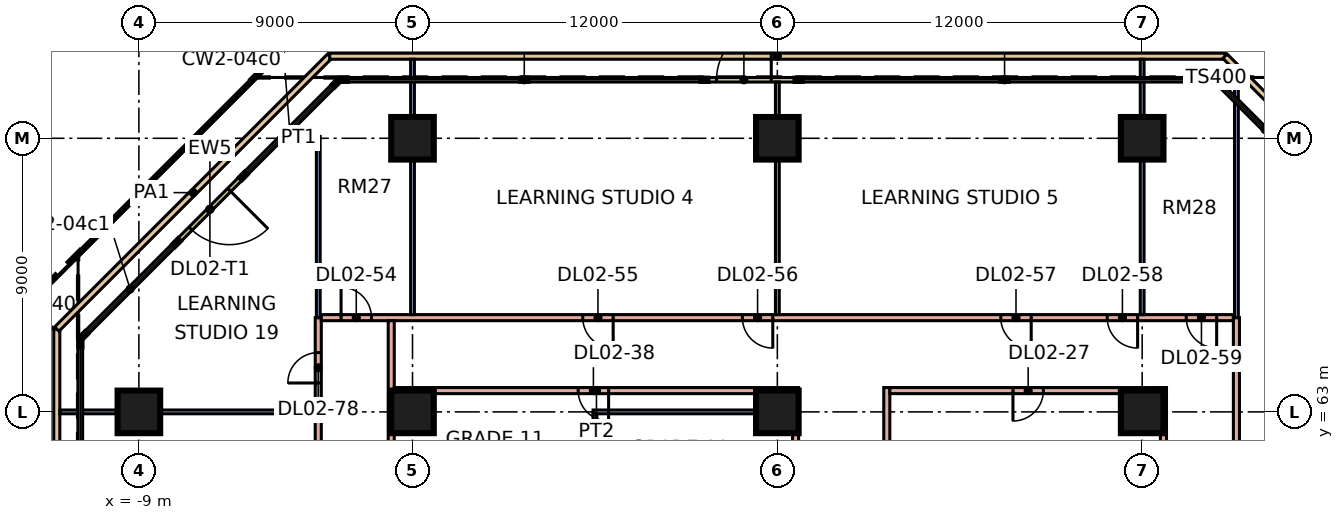
"""IFC4 building model, lengths in metres.
Left out: names, types, materials, properties, quantities, classifications, styles, units other than length and angle.
Written with IfcOpenShell. Run it as: python <this file> out.ifc"""

import sys

from ifc_helpers import new_model, si_unit, direction, frame, frame_2d, origin, origin_2d, place, context, subcontext, project, spatial, rectangle, extrude, element, fill, save


model = new_model("IFC4")
c1 = context("Model", 3, precision=1e-05, world=origin(), true_north=direction((0.0, 1.0)))
c2 = subcontext(c1, "Body", "Model", "MODEL_VIEW")
j1 = project(units=[si_unit("LENGTHUNIT", "METRE"), si_unit("PLANEANGLEUNIT", "RADIAN")], contexts=[c1])
p1 = place(None, origin())
s1 = spatial("IfcSite", under=j1, at=p1, CompositionType="ELEMENT")
p2 = place(p1, origin())
s2 = spatial("IfcBuilding", under=s1, at=p2, CompositionType="ELEMENT")
p3 = place(p2, frame((0.0, 0.0, 12.0)))
s3 = spatial("IfcBuildingStorey", under=s2, at=p3, CompositionType="ELEMENT", Elevation=12.0)
for number, where, z_axis, x_axis in (
    (1, (-9.0, 63.0, 0.0), (0.0, 0.0, 1.0), (1.0, 0.0, 0.0)),
    (2, (0.0, 63.0, 0.0), (0.0, 0.0, 1.0), (1.0, 0.0, 0.0)),
    (3, (12.0, 63.0, 0.0), (0.0, 0.0, 1.0), (1.0, 0.0, 0.0)),
    (4, (24.0, 63.0, 0.0), (0.0, 0.0, 1.0), (1.0, 0.0, 0.0)),
    (5, (0.0, 72.0, 0.0), (0.0, 0.0, 1.0), (1.0, 0.0, 0.0)),
    (6, (12.0, 72.0, 0.0), (0.0, 0.0, 1.0), (1.0, 0.0, 0.0)),
    (7, (24.0, 72.0, 0.0), (0.0, 0.0, 1.0), (1.0, 0.0, 0.0)),
):
    element("IfcColumn", number, at=place(p3, frame(where, z_axis=z_axis, x_axis=x_axis)), inside=s3, PredefinedType="COLUMN", context=c2, shape_type="SweptSolid", body=[
        extrude(rectangle(XDim=1.4, YDim=1.4, at=origin_2d()), origin(), (0.0, 0.0, 1.0), 4.8),
    ])
p4 = place(p3, frame((12.65, 73.925, 0.0), z_axis=(0.0, 0.0, 1.0), x_axis=(-1.0, 0.0, 0.0)))
e8 = element("IfcWall", 8, at=p4, inside=s3, PredefinedType="SOLIDWALL", context=c2, shape_type="SweptSolid", body=[
    extrude(rectangle(XDim=3.0, YDim=0.15, at=frame_2d((1.5, 0.0))), origin(), (0.0, 0.0, 1.0), 4.4),
])
p5 = place(p4, frame((0.85, 0.0, 0.0)))
e9 = element("IfcOpeningElement", 9, at=p5, cuts=e8, PredefinedType="OPENING", context=c2, shape_type="SweptSolid", body=[
    extrude(rectangle(XDim=1.8, YDim=2.4, at=frame_2d((0.9, 1.2))), frame((0.0, 0.085, 0.0), z_axis=(0.0, -1.0, 0.0), x_axis=(1.0, 0.0, 0.0)), (0.0, 0.0, 1.0), 0.17),
])
p6 = place(p3, frame((-5.604, 70.725, 0.0), z_axis=(0.0, 0.0, 1.0), x_axis=(-0.707106781187, -0.707106781187, 0.0)))
e10 = element("IfcWall", 10, at=p6, inside=s3, PredefinedType="SOLIDWALL", context=c2, shape_type="SweptSolid", body=[
    extrude(rectangle(XDim=3.0, YDim=0.15, at=frame_2d((1.5, 0.0))), origin(), (0.0, 0.0, 1.0), 4.4),
])
p7 = place(p6, frame((0.6, 0.0, 0.0)))
e11 = element("IfcOpeningElement", 11, at=p7, cuts=e10, PredefinedType="OPENING", context=c2, shape_type="SweptSolid", body=[
    extrude(rectangle(XDim=1.8, YDim=2.4, at=frame_2d((0.9, 1.2))), frame((0.0, 0.085, 0.0), z_axis=(0.0, -1.0, 0.0), x_axis=(1.0, 0.0, 0.0)), (0.0, 0.0, 1.0), 0.17),
])
p8 = place(p3, frame((-11.7, 8.275, 0.0), z_axis=(0.0, 0.0, 1.0), x_axis=(0.0, 1.0, 0.0)))
e12 = element("IfcWall", 12, at=p8, inside=s3, PredefinedType="PARAPET", context=c2, shape_type="SweptSolid", body=[
    extrude(rectangle(XDim=57.45, YDim=0.2, at=frame_2d((28.725, 0.0))), origin(), (0.0, 0.0, 1.0), 0.5),
])
p9 = place(p3, frame((-11.7, 65.725, 0.0), z_axis=(0.0, 0.0, 1.0), x_axis=(0.707106781187, 0.707106781187, 0.0)))
e13 = element("IfcWall", 13, at=p9, inside=s3, PredefinedType="PARAPET", context=c2, shape_type="SweptSolid", body=[
    extrude(rectangle(XDim=12.692, YDim=0.2, at=frame_2d((6.346, 0.0))), origin(), (0.0, 0.0, 1.0), 0.5),
])
p10 = place(p3, frame((-2.725, 74.7, 0.0), z_axis=(0.0, 0.0, 1.0), x_axis=(1.0, 0.0, 0.0)))
e14 = element("IfcWall", 14, at=p10, inside=s3, PredefinedType="PARAPET", context=c2, shape_type="SweptSolid", body=[
    extrude(rectangle(XDim=29.45, YDim=0.2, at=frame_2d((14.725, 0.0))), origin(), (0.0, 0.0, 1.0), 0.5),
])
p11 = place(p3, frame((26.725, 74.7, 0.0), z_axis=(0.0, 0.0, 1.0), x_axis=(0.707106781187, -0.707106781187, 0.0)))
e15 = element("IfcWall", 15, at=p11, inside=s3, PredefinedType="PARAPET", context=c2, shape_type="SweptSolid", body=[
    extrude(rectangle(XDim=12.692, YDim=0.2, at=frame_2d((6.346, 0.0))), origin(), (0.0, 0.0, 1.0), 0.5),
])
p12 = place(p3, frame((-11.6, 63.0, 0.0), z_axis=(0.0, 0.0, 1.0), x_axis=(1.0, 0.0, 0.0)))
e16 = element("IfcWall", 16, at=p12, inside=s3, PredefinedType="PARTITIONING", context=c2, shape_type="SweptSolid", body=[
    extrude(rectangle(XDim=8.4, YDim=0.125, at=frame_2d((4.2, 0.0))), origin(), (0.0, 0.0, 1.0), 4.4),
])
p13 = place(p3, frame((-4.329, 72.0, 0.0), z_axis=(0.0, 0.0, 1.0), x_axis=(1.0, 0.0, 0.0)))
e17 = element("IfcWall", 17, at=p13, inside=s3, PredefinedType="PARTITIONING", context=c2, shape_type="SweptSolid", body=[
    extrude(rectangle(XDim=1.167, YDim=0.125, at=frame_2d((0.583, 0.0))), origin(), (0.0, 0.0, 1.0), 4.4),
])
p14 = place(p3, frame((-3.1, -0.184, 0.0), z_axis=(0.0, 0.0, 1.0), x_axis=(0.0, 1.0, 0.0)))
e18 = element("IfcWall", 18, at=p14, inside=s3, PredefinedType="PARTITIONING", context=c2, shape_type="SweptSolid", body=[
    extrude(rectangle(XDim=66.284, YDim=0.2, at=frame_2d((33.142, 0.0))), origin(), (0.0, 0.0, 1.0), 4.4),
])
p15 = place(p14, frame((6.034, 0.0, 0.0)))
e19 = element("IfcOpeningElement", 19, at=p15, cuts=e18, PredefinedType="OPENING", context=c2, shape_type="SweptSolid", body=[
    extrude(rectangle(XDim=1.0, YDim=2.1, at=frame_2d((0.5, 1.05))), frame((0.0, 0.11, 0.0), z_axis=(0.0, -1.0, 0.0), x_axis=(1.0, 0.0, 0.0)), (0.0, 0.0, 1.0), 0.22),
])
p16 = place(p14, frame((17.784, 0.0, 0.0)))
e20 = element("IfcOpeningElement", 20, at=p16, cuts=e18, PredefinedType="OPENING", context=c2, shape_type="SweptSolid", body=[
    extrude(rectangle(XDim=1.0, YDim=2.1, at=frame_2d((0.5, 1.05))), frame((0.0, 0.11, 0.0), z_axis=(0.0, -1.0, 0.0), x_axis=(1.0, 0.0, 0.0)), (0.0, 0.0, 1.0), 0.22),
])
p17 = place(p14, frame((23.034, 0.0, 0.0)))
e21 = element("IfcOpeningElement", 21, at=p17, cuts=e18, PredefinedType="OPENING", context=c2, shape_type="SweptSolid", body=[
    extrude(rectangle(XDim=1.0, YDim=2.1, at=frame_2d((0.5, 1.05))), frame((0.0, 0.11, 0.0), z_axis=(0.0, -1.0, 0.0), x_axis=(1.0, 0.0, 0.0)), (0.0, 0.0, 1.0), 0.22),
])
p18 = place(p14, frame((29.784, 0.0, 0.0)))
e22 = element("IfcOpeningElement", 22, at=p18, cuts=e18, PredefinedType="OPENING", context=c2, shape_type="SweptSolid", body=[
    extrude(rectangle(XDim=1.0, YDim=2.1, at=frame_2d((0.5, 1.05))), frame((0.0, 0.11, 0.0), z_axis=(0.0, -1.0, 0.0), x_axis=(1.0, 0.0, 0.0)), (0.0, 0.0, 1.0), 0.22),
])
p19 = place(p14, frame((35.034, 0.0, 0.0)))
e23 = element("IfcOpeningElement", 23, at=p19, cuts=e18, PredefinedType="OPENING", context=c2, shape_type="SweptSolid", body=[
    extrude(rectangle(XDim=1.0, YDim=2.1, at=frame_2d((0.5, 1.05))), frame((0.0, 0.11, 0.0), z_axis=(0.0, -1.0, 0.0), x_axis=(1.0, 0.0, 0.0)), (0.0, 0.0, 1.0), 0.22),
])
p20 = place(p14, frame((40.284, 0.0, 0.0)))
e24 = element("IfcOpeningElement", 24, at=p20, cuts=e18, PredefinedType="OPENING", context=c2, shape_type="SweptSolid", body=[
    extrude(rectangle(XDim=1.0, YDim=2.1, at=frame_2d((0.5, 1.05))), frame((0.0, 0.11, 0.0), z_axis=(0.0, -1.0, 0.0), x_axis=(1.0, 0.0, 0.0)), (0.0, 0.0, 1.0), 0.22),
])
p21 = place(p14, frame((49.284, 0.0, 0.0)))
e25 = element("IfcOpeningElement", 25, at=p21, cuts=e18, PredefinedType="OPENING", context=c2, shape_type="SweptSolid", body=[
    extrude(rectangle(XDim=1.0, YDim=2.1, at=frame_2d((0.5, 1.05))), frame((0.0, 0.11, 0.0), z_axis=(0.0, -1.0, 0.0), x_axis=(1.0, 0.0, 0.0)), (0.0, 0.0, 1.0), 0.22),
])
p22 = place(p14, frame((58.284, 0.0, 0.0)))
e26 = element("IfcOpeningElement", 26, at=p22, cuts=e18, PredefinedType="OPENING", context=c2, shape_type="SweptSolid", body=[
    extrude(rectangle(XDim=1.0, YDim=2.1, at=frame_2d((0.5, 1.05))), frame((0.0, 0.11, 0.0), z_axis=(0.0, -1.0, 0.0), x_axis=(1.0, 0.0, 0.0)), (0.0, 0.0, 1.0), 0.22),
])
p23 = place(p14, frame((64.134, 0.0, 0.0)))
e27 = element("IfcOpeningElement", 27, at=p23, cuts=e18, PredefinedType="OPENING", context=c2, shape_type="SweptSolid", body=[
    extrude(rectangle(XDim=1.0, YDim=2.1, at=frame_2d((0.5, 1.05))), frame((0.0, 0.11, 0.0), z_axis=(0.0, -1.0, 0.0), x_axis=(1.0, 0.0, 0.0)), (0.0, 0.0, 1.0), 0.22),
])
p24 = place(p3, frame((-3.1, 66.1, 0.0), z_axis=(0.0, 0.0, 1.0), x_axis=(0.0, 1.0, 0.0)))
e28 = element("IfcWall", 28, at=p24, inside=s3, PredefinedType="PARTITIONING", context=c2, shape_type="SweptSolid", body=[
    extrude(rectangle(XDim=5.962, YDim=0.125, at=frame_2d((2.981, 0.0))), origin(), (0.0, 0.0, 1.0), 4.4),
])
p25 = place(p3, frame((-3.0, 66.1, 0.0), z_axis=(0.0, 0.0, 1.0), x_axis=(1.0, 0.0, 0.0)))
e29 = element("IfcWall", 29, at=p25, inside=s3, PredefinedType="PARTITIONING", context=c2, shape_type="SweptSolid", body=[
    extrude(rectangle(XDim=30.0, YDim=0.2, at=frame_2d((15.0, 0.0))), origin(), (0.0, 0.0, 1.0), 4.4),
])
p26 = place(p25, frame((0.65, 0.0, 0.0)))
e30 = element("IfcOpeningElement", 30, at=p26, cuts=e29, PredefinedType="OPENING", context=c2, shape_type="SweptSolid", body=[
    extrude(rectangle(XDim=1.0, YDim=2.1, at=frame_2d((0.5, 1.05))), frame((0.0, 0.11, 0.0), z_axis=(0.0, -1.0, 0.0), x_axis=(1.0, 0.0, 0.0)), (0.0, 0.0, 1.0), 0.22),
])
p27 = place(p25, frame((8.6, 0.0, 0.0)))
e31 = element("IfcOpeningElement", 31, at=p27, cuts=e29, PredefinedType="OPENING", context=c2, shape_type="SweptSolid", body=[
    extrude(rectangle(XDim=1.0, YDim=2.1, at=frame_2d((0.5, 1.05))), frame((0.0, 0.11, 0.0), z_axis=(0.0, -1.0, 0.0), x_axis=(1.0, 0.0, 0.0)), (0.0, 0.0, 1.0), 0.22),
])
p28 = place(p25, frame((13.85, 0.0, 0.0)))
e32 = element("IfcOpeningElement", 32, at=p28, cuts=e29, PredefinedType="OPENING", context=c2, shape_type="SweptSolid", body=[
    extrude(rectangle(XDim=1.0, YDim=2.1, at=frame_2d((0.5, 1.05))), frame((0.0, 0.11, 0.0), z_axis=(0.0, -1.0, 0.0), x_axis=(1.0, 0.0, 0.0)), (0.0, 0.0, 1.0), 0.22),
])
p29 = place(p25, frame((22.35, 0.0, 0.0)))
e33 = element("IfcOpeningElement", 33, at=p29, cuts=e29, PredefinedType="OPENING", context=c2, shape_type="SweptSolid", body=[
    extrude(rectangle(XDim=1.0, YDim=2.1, at=frame_2d((0.5, 1.05))), frame((0.0, 0.11, 0.0), z_axis=(0.0, -1.0, 0.0), x_axis=(1.0, 0.0, 0.0)), (0.0, 0.0, 1.0), 0.22),
])
p30 = place(p25, frame((25.85, 0.0, 0.0)))
e34 = element("IfcOpeningElement", 34, at=p30, cuts=e29, PredefinedType="OPENING", context=c2, shape_type="SweptSolid", body=[
    extrude(rectangle(XDim=1.0, YDim=2.1, at=frame_2d((0.5, 1.05))), frame((0.0, 0.11, 0.0), z_axis=(0.0, -1.0, 0.0), x_axis=(1.0, 0.0, 0.0)), (0.0, 0.0, 1.0), 0.22),
])
p31 = place(p25, frame((28.45, 0.0, 0.0)))
e35 = element("IfcOpeningElement", 35, at=p31, cuts=e29, PredefinedType="OPENING", context=c2, shape_type="SweptSolid", body=[
    extrude(rectangle(XDim=1.0, YDim=2.1, at=frame_2d((0.5, 1.05))), frame((0.0, 0.11, 0.0), z_axis=(0.0, -1.0, 0.0), x_axis=(1.0, 0.0, 0.0)), (0.0, 0.0, 1.0), 0.22),
])
p32 = place(p3, frame((-0.7, 59.6, 0.0), z_axis=(0.0, 0.0, 1.0), x_axis=(0.0, 1.0, 0.0)))
e36 = element("IfcWall", 36, at=p32, inside=s3, PredefinedType="PARTITIONING", context=c2, shape_type="SweptSolid", body=[
    extrude(rectangle(XDim=6.4, YDim=0.2, at=frame_2d((3.2, 0.0))), origin(), (0.0, 0.0, 1.0), 4.4),
])
p33 = place(p3, frame((-0.6, 63.7, 0.0), z_axis=(0.0, 0.0, 1.0), x_axis=(1.0, 0.0, 0.0)))
e37 = element("IfcWall", 37, at=p33, inside=s3, PredefinedType="PARTITIONING", context=c2, shape_type="SweptSolid", body=[
    extrude(rectangle(XDim=13.3, YDim=0.2, at=frame_2d((6.65, 0.0))), origin(), (0.0, 0.0, 1.0), 4.4),
])
p34 = place(p33, frame((6.05, 0.0, 0.0)))
e38 = element("IfcOpeningElement", 38, at=p34, cuts=e37, PredefinedType="OPENING", context=c2, shape_type="SweptSolid", body=[
    extrude(rectangle(XDim=1.0, YDim=2.1, at=frame_2d((0.5, 1.05))), frame((0.0, 0.11, 0.0), z_axis=(0.0, -1.0, 0.0), x_axis=(1.0, 0.0, 0.0)), (0.0, 0.0, 1.0), 0.22),
])
p35 = place(p3, frame((0.0, 66.2, 0.0), z_axis=(0.0, 0.0, 1.0), x_axis=(0.0, 1.0, 0.0)))
e39 = element("IfcWall", 39, at=p35, inside=s3, PredefinedType="PARTITIONING", context=c2, shape_type="SweptSolid", body=[
    extrude(rectangle(XDim=8.4, YDim=0.125, at=frame_2d((4.2, 0.0))), origin(), (0.0, 0.0, 1.0), 4.4),
])
p36 = place(p3, frame((5.938, 63.0, 0.0), z_axis=(0.0, 0.0, 1.0), x_axis=(1.0, 0.0, 0.0)))
e40 = element("IfcWall", 40, at=p36, inside=s3, PredefinedType="PARTITIONING", context=c2, shape_type="SweptSolid", body=[
    extrude(rectangle(XDim=6.562, YDim=0.125, at=frame_2d((3.281, 0.0))), origin(), (0.0, 0.0, 1.0), 4.4),
])
p37 = place(p3, frame((6.0, 59.7, 0.0), z_axis=(0.0, 0.0, 1.0), x_axis=(0.0, 1.0, 0.0)))
e41 = element("IfcWall", 41, at=p37, inside=s3, PredefinedType="PARTITIONING", context=c2, shape_type="SweptSolid", body=[
    extrude(rectangle(XDim=3.238, YDim=0.125, at=frame_2d((1.619, 0.0))), origin(), (0.0, 0.0, 1.0), 4.4),
])
p38 = place(p3, frame((12.0, 66.2, 0.0), z_axis=(0.0, 0.0, 1.0), x_axis=(0.0, 1.0, 0.0)))
e42 = element("IfcWall", 42, at=p38, inside=s3, PredefinedType="PARTITIONING", context=c2, shape_type="SweptSolid", body=[
    extrude(rectangle(XDim=7.651, YDim=0.125, at=frame_2d((3.826, 0.0))), origin(), (0.0, 0.0, 1.0), 4.4),
])
p39 = place(p3, frame((12.6, 59.6, 0.0), z_axis=(0.0, 0.0, 1.0), x_axis=(0.0, 1.0, 0.0)))
e43 = element("IfcWall", 43, at=p39, inside=s3, PredefinedType="PARTITIONING", context=c2, shape_type="SweptSolid", body=[
    extrude(rectangle(XDim=4.0, YDim=0.2, at=frame_2d((2.0, 0.0))), origin(), (0.0, 0.0, 1.0), 4.4),
])
p40 = place(p39, frame((1.25, 0.0, 0.0)))
e44 = element("IfcOpeningElement", 44, at=p40, cuts=e43, PredefinedType="OPENING", context=c2, shape_type="SweptSolid", body=[
    extrude(rectangle(XDim=1.0, YDim=2.1, at=frame_2d((0.5, 1.05))), frame((0.0, 0.11, 0.0), z_axis=(0.0, -1.0, 0.0), x_axis=(1.0, 0.0, 0.0)), (0.0, 0.0, 1.0), 0.22),
])
p41 = place(p3, frame((15.6, 51.225, 0.0), z_axis=(0.0, 0.0, 1.0), x_axis=(0.0, 1.0, 0.0)))
e45 = element("IfcWall", 45, at=p41, inside=s3, PredefinedType="PARTITIONING", context=c2, shape_type="SweptSolid", body=[
    extrude(rectangle(XDim=12.575, YDim=0.2, at=frame_2d((6.288, 0.0))), origin(), (0.0, 0.0, 1.0), 4.4),
])
p42 = place(p41, frame((6.025, 0.0, 0.0)))
e46 = element("IfcOpeningElement", 46, at=p42, cuts=e45, PredefinedType="OPENING", context=c2, shape_type="SweptSolid", body=[
    extrude(rectangle(XDim=1.0, YDim=2.1, at=frame_2d((0.5, 1.05))), frame((0.0, 0.11, 0.0), z_axis=(0.0, -1.0, 0.0), x_axis=(1.0, 0.0, 0.0)), (0.0, 0.0, 1.0), 0.22),
])
p43 = place(p3, frame((15.7, 63.7, 0.0), z_axis=(0.0, 0.0, 1.0), x_axis=(1.0, 0.0, 0.0)))
e47 = element("IfcWall", 47, at=p43, inside=s3, PredefinedType="PARTITIONING", context=c2, shape_type="SweptSolid", body=[
    extrude(rectangle(XDim=8.9, YDim=0.2, at=frame_2d((4.45, 0.0))), origin(), (0.0, 0.0, 1.0), 4.4),
])
p44 = place(p43, frame((4.05, 0.0, 0.0)))
e48 = element("IfcOpeningElement", 48, at=p44, cuts=e47, PredefinedType="OPENING", context=c2, shape_type="SweptSolid", body=[
    extrude(rectangle(XDim=1.0, YDim=2.1, at=frame_2d((0.5, 1.05))), frame((0.0, 0.11, 0.0), z_axis=(0.0, -1.0, 0.0), x_axis=(1.0, 0.0, 0.0)), (0.0, 0.0, 1.0), 0.22),
])
p45 = place(p3, frame((24.0, 66.2, 0.0), z_axis=(0.0, 0.0, 1.0), x_axis=(0.0, 1.0, 0.0)))
e49 = element("IfcWall", 49, at=p45, inside=s3, PredefinedType="PARTITIONING", context=c2, shape_type="SweptSolid", body=[
    extrude(rectangle(XDim=8.4, YDim=0.125, at=frame_2d((4.2, 0.0))), origin(), (0.0, 0.0, 1.0), 4.4),
])
p46 = place(p3, frame((24.7, 44.3, 0.0), z_axis=(0.0, 0.0, 1.0), x_axis=(0.0, 1.0, 0.0)))
e50 = element("IfcWall", 50, at=p46, inside=s3, PredefinedType="PARTITIONING", context=c2, shape_type="SweptSolid", body=[
    extrude(rectangle(XDim=19.5, YDim=0.2, at=frame_2d((9.75, 0.0))), origin(), (0.0, 0.0, 1.0), 4.4),
])
p47 = place(p46, frame((1.45, 0.0, 0.0)))
e51 = element("IfcOpeningElement", 51, at=p47, cuts=e50, PredefinedType="OPENING", context=c2, shape_type="SweptSolid", body=[
    extrude(rectangle(XDim=1.0, YDim=2.1, at=frame_2d((0.5, 1.05))), frame((0.0, 0.11, 0.0), z_axis=(0.0, -1.0, 0.0), x_axis=(1.0, 0.0, 0.0)), (0.0, 0.0, 1.0), 0.22),
])
p48 = place(p46, frame((6.65, 0.0, 0.0)))
e52 = element("IfcOpeningElement", 52, at=p48, cuts=e50, PredefinedType="OPENING", context=c2, shape_type="SweptSolid", body=[
    extrude(rectangle(XDim=1.0, YDim=2.1, at=frame_2d((0.5, 1.05))), frame((0.0, 0.11, 0.0), z_axis=(0.0, -1.0, 0.0), x_axis=(1.0, 0.0, 0.0)), (0.0, 0.0, 1.0), 0.22),
])
p49 = place(p3, frame((27.1, 38.5, 0.0), z_axis=(0.0, 0.0, 1.0), x_axis=(0.0, 1.0, 0.0)))
e53 = element("IfcWall", 53, at=p49, inside=s3, PredefinedType="PARTITIONING", context=c2, shape_type="SweptSolid", body=[
    extrude(rectangle(XDim=27.6, YDim=0.2, at=frame_2d((13.8, 0.0))), origin(), (0.0, 0.0, 1.0), 4.4),
])
p50 = place(p49, frame((13.05, 0.0, 0.0)))
e54 = element("IfcOpeningElement", 54, at=p50, cuts=e53, PredefinedType="OPENING", context=c2, shape_type="SweptSolid", body=[
    extrude(rectangle(XDim=1.8, YDim=2.1, at=frame_2d((0.9, 1.05))), frame((0.0, 0.11, 0.0), z_axis=(0.0, -1.0, 0.0), x_axis=(1.0, 0.0, 0.0)), (0.0, 0.0, 1.0), 0.22),
])
p51 = place(p49, frame((3.05, 0.0, 0.0)))
e55 = element("IfcOpeningElement", 55, at=p51, cuts=e53, PredefinedType="OPENING", context=c2, shape_type="SweptSolid", body=[
    extrude(rectangle(XDim=1.8, YDim=2.1, at=frame_2d((0.9, 1.05))), frame((0.0, 0.11, 0.0), z_axis=(0.0, -1.0, 0.0), x_axis=(1.0, 0.0, 0.0)), (0.0, 0.0, 1.0), 0.22),
])
p52 = place(p3, frame((27.1, 66.1, 0.0), z_axis=(0.0, 0.0, 1.0), x_axis=(0.0, 1.0, 0.0)))
e56 = element("IfcWall", 56, at=p52, inside=s3, PredefinedType="PARTITIONING", context=c2, shape_type="SweptSolid", body=[
    extrude(rectangle(XDim=8.083, YDim=0.125, at=frame_2d((4.042, 0.0))), origin(), (0.0, 0.0, 1.0), 4.4),
])
p53 = place(p5, frame((1.8, 0.0, 0.0), z_axis=(0.0, 0.0, 1.0), x_axis=(-1.0, 0.0, 0.0)))
e57 = element("IfcDoor", 57, at=p53, inside=s3, OperationType="DOUBLE_DOOR_SINGLE_SWING", PredefinedType="DOOR", context=c2, shape_type="SweptSolid", body=[
    extrude(rectangle(XDim=1.8, YDim=2.4, at=frame_2d((0.9, 1.2))), frame((0.0, 0.025, 0.0), z_axis=(0.0, -1.0, 0.0), x_axis=(1.0, 0.0, 0.0)), (0.0, 0.0, 1.0), 0.05),
])
fill(e9, e57)
p54 = place(p7, origin())
e58 = element("IfcDoor", 58, at=p54, inside=s3, OperationType="DOUBLE_DOOR_SINGLE_SWING", PredefinedType="DOOR", context=c2, shape_type="SweptSolid", body=[
    extrude(rectangle(XDim=1.8, YDim=2.4, at=frame_2d((0.9, 1.2))), frame((0.0, 0.025, 0.0), z_axis=(0.0, -1.0, 0.0), x_axis=(1.0, 0.0, 0.0)), (0.0, 0.0, 1.0), 0.05),
])
fill(e11, e58)
p55 = place(p44, frame((1.0, 0.0, 0.0), z_axis=(0.0, 0.0, 1.0), x_axis=(-1.0, 0.0, 0.0)))
e59 = element("IfcDoor", 59, at=p55, inside=s3, OperationType="SINGLE_SWING_LEFT", PredefinedType="DOOR", context=c2, shape_type="SweptSolid", body=[
    extrude(rectangle(XDim=1.0, YDim=2.1, at=frame_2d((0.5, 1.05))), frame((0.0, 0.025, 0.0), z_axis=(0.0, -1.0, 0.0), x_axis=(1.0, 0.0, 0.0)), (0.0, 0.0, 1.0), 0.05),
])
fill(e48, e59)
p56 = place(p34, origin())
e60 = element("IfcDoor", 60, at=p56, inside=s3, OperationType="SINGLE_SWING_RIGHT", PredefinedType="DOOR", context=c2, shape_type="SweptSolid", body=[
    extrude(rectangle(XDim=1.0, YDim=2.1, at=frame_2d((0.5, 1.05))), frame((0.0, 0.025, 0.0), z_axis=(0.0, -1.0, 0.0), x_axis=(1.0, 0.0, 0.0)), (0.0, 0.0, 1.0), 0.05),
])
fill(e38, e60)
p57 = place(p26, origin())
e61 = element("IfcDoor", 61, at=p57, inside=s3, OperationType="SINGLE_SWING_LEFT", PredefinedType="DOOR", context=c2, shape_type="SweptSolid", body=[
    extrude(rectangle(XDim=1.0, YDim=2.1, at=frame_2d((0.5, 1.05))), frame((0.0, 0.025, 0.0), z_axis=(0.0, -1.0, 0.0), x_axis=(1.0, 0.0, 0.0)), (0.0, 0.0, 1.0), 0.05),
])
fill(e30, e61)
p58 = place(p27, origin())
e62 = element("IfcDoor", 62, at=p58, inside=s3, OperationType="SINGLE_SWING_RIGHT", PredefinedType="DOOR", context=c2, shape_type="SweptSolid", body=[
    extrude(rectangle(XDim=1.0, YDim=2.1, at=frame_2d((0.5, 1.05))), frame((0.0, 0.025, 0.0), z_axis=(0.0, -1.0, 0.0), x_axis=(1.0, 0.0, 0.0)), (0.0, 0.0, 1.0), 0.05),
])
fill(e31, e62)
p59 = place(p28, origin())
e63 = element("IfcDoor", 63, at=p59, inside=s3, OperationType="SINGLE_SWING_RIGHT", PredefinedType="DOOR", context=c2, shape_type="SweptSolid", body=[
    extrude(rectangle(XDim=1.0, YDim=2.1, at=frame_2d((0.5, 1.05))), frame((0.0, 0.025, 0.0), z_axis=(0.0, -1.0, 0.0), x_axis=(1.0, 0.0, 0.0)), (0.0, 0.0, 1.0), 0.05),
])
fill(e32, e63)
p60 = place(p29, origin())
e64 = element("IfcDoor", 64, at=p60, inside=s3, OperationType="SINGLE_SWING_RIGHT", PredefinedType="DOOR", context=c2, shape_type="SweptSolid", body=[
    extrude(rectangle(XDim=1.0, YDim=2.1, at=frame_2d((0.5, 1.05))), frame((0.0, 0.025, 0.0), z_axis=(0.0, -1.0, 0.0), x_axis=(1.0, 0.0, 0.0)), (0.0, 0.0, 1.0), 0.05),
])
fill(e33, e64)
p61 = place(p30, origin())
e65 = element("IfcDoor", 65, at=p61, inside=s3, OperationType="SINGLE_SWING_RIGHT", PredefinedType="DOOR", context=c2, shape_type="SweptSolid", body=[
    extrude(rectangle(XDim=1.0, YDim=2.1, at=frame_2d((0.5, 1.05))), frame((0.0, 0.025, 0.0), z_axis=(0.0, -1.0, 0.0), x_axis=(1.0, 0.0, 0.0)), (0.0, 0.0, 1.0), 0.05),
])
fill(e34, e65)
p62 = place(p31, origin())
e66 = element("IfcDoor", 66, at=p62, inside=s3, OperationType="SINGLE_SWING_RIGHT", PredefinedType="DOOR", context=c2, shape_type="SweptSolid", body=[
    extrude(rectangle(XDim=1.0, YDim=2.1, at=frame_2d((0.5, 1.05))), frame((0.0, 0.025, 0.0), z_axis=(0.0, -1.0, 0.0), x_axis=(1.0, 0.0, 0.0)), (0.0, 0.0, 1.0), 0.05),
])
fill(e35, e66)
p63 = place(p23, origin())
e67 = element("IfcDoor", 67, at=p63, inside=s3, OperationType="SINGLE_SWING_LEFT", PredefinedType="DOOR", context=c2, shape_type="SweptSolid", body=[
    extrude(rectangle(XDim=1.0, YDim=2.1, at=frame_2d((0.5, 1.05))), frame((0.0, 0.025, 0.0), z_axis=(0.0, -1.0, 0.0), x_axis=(1.0, 0.0, 0.0)), (0.0, 0.0, 1.0), 0.05),
])
fill(e27, e67)
save(model, sys.argv[1])
